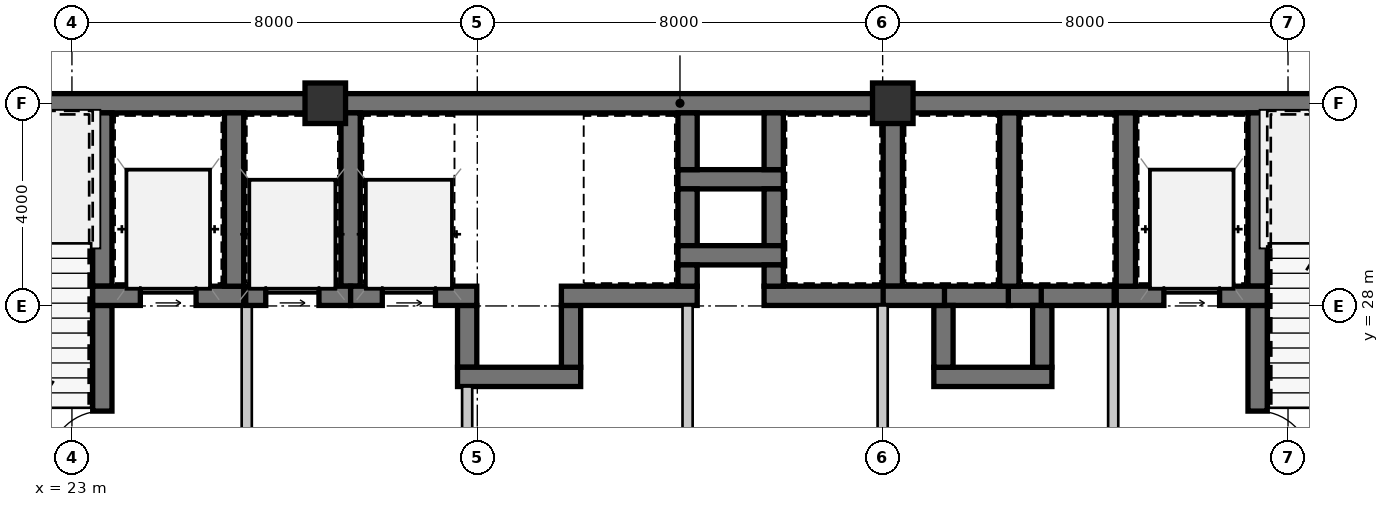
"""IFC4 building model, lengths in metres.
Left out: names, types, materials, properties, quantities, classifications, styles, units other than length and angle.
Written with IfcOpenShell. Run it as: python <this file> out.ifc"""

import sys

from ifc_helpers import new_model, si_unit, direction, frame, frame_2d, origin, origin_2d, place, context, subcontext, project, spatial, rectangle, extrude, source, transform, mapped, element, fill, save


model = new_model("IFC4")
c1 = context("Model", 3, precision=1e-05, world=origin(), true_north=direction((0.0, 1.0)))
c2 = subcontext(c1, "Body", "Model", "MODEL_VIEW")
j1 = project(units=[si_unit("LENGTHUNIT", "METRE"), si_unit("PLANEANGLEUNIT", "RADIAN")], contexts=[c1])
p1 = place(None, origin())
s1 = spatial("IfcSite", under=j1, at=p1, CompositionType="ELEMENT")
p2 = place(p1, origin())
s2 = spatial("IfcBuilding", under=s1, at=p2, CompositionType="ELEMENT")
p3 = place(p2, frame((0.0, 0.0, 38.85)))
s3 = spatial("IfcBuildingStorey", under=s2, at=p3, CompositionType="ELEMENT", Elevation=38.85)
m1 = source(origin(), c2, "Body", "SweptSolid", [
    extrude(rectangle(XDim=0.8, YDim=0.8, at=origin_2d()), origin(), (0.0, 0.0, 1.0), 3.15),
])
for number, where, z_axis, x_axis in (
    (1, (28.0, 32.0, 0.0), (0.0, 0.0, 1.0), (1.0, 0.0, 0.0)),
    (2, (39.2, 32.0, 0.0), (0.0, 0.0, 1.0), (1.0, 0.0, 0.0)),
):
    element("IfcColumn", number, at=place(p3, frame(where, z_axis=z_axis, x_axis=x_axis)), inside=s3, PredefinedType="COLUMN", context=c2, shape_type="MappedRepresentation", body=[
        mapped(m1, transform((0.0, 0.0, 0.0), scale=1.0)),
    ])
m2 = source(origin(), c2, "Body", "SweptSolid", [
    extrude(rectangle(XDim=9.19, YDim=0.38, at=frame_2d((4.595, 0.0))), origin(), (0.0, 0.0, 1.0), 2.93),
])
p4 = place(p3, frame((18.81, 32.0, 0.0), z_axis=(0.0, 0.0, 1.0), x_axis=(1.0, 0.0, 0.0)))
e3 = element("IfcWall", 3, at=p4, inside=s3, PredefinedType="SHEAR", context=c2, shape_type="MappedRepresentation", body=[
    mapped(m2, transform((0.0, 0.0, 0.0), scale=1.0)),
])
m3 = source(origin(), c2, "Body", "SweptSolid", [
    extrude(rectangle(XDim=11.2, YDim=0.38, at=frame_2d((5.6, 0.0))), origin(), (0.0, 0.0, 1.0), 2.93),
])
p5 = place(p3, frame((28.0, 32.0, 0.0), z_axis=(0.0, 0.0, 1.0), x_axis=(1.0, 0.0, 0.0)))
e4 = element("IfcWall", 4, at=p5, inside=s3, PredefinedType="SHEAR", context=c2, shape_type="MappedRepresentation", body=[
    mapped(m3, transform((0.0, 0.0, 0.0), scale=1.0)),
])
m4 = source(origin(), c2, "Body", "SweptSolid", [
    extrude(rectangle(XDim=11.99, YDim=0.38, at=frame_2d((5.995, 0.0))), origin(), (0.0, 0.0, 1.0), 2.93),
])
p6 = place(p3, frame((39.2, 32.0, 0.0), z_axis=(0.0, 0.0, 1.0), x_axis=(1.0, 0.0, 0.0)))
e5 = element("IfcWall", 5, at=p6, inside=s3, PredefinedType="SHEAR", context=c2, shape_type="MappedRepresentation", body=[
    mapped(m4, transform((0.0, 0.0, 0.0), scale=1.0)),
])
m5 = source(origin(), c2, "Body", "SweptSolid", [
    extrude(rectangle(XDim=3.42, YDim=0.38, at=frame_2d((1.71, 0.0))), origin(), (0.0, 0.0, 1.0), 2.93),
])
p7 = place(p3, frame((23.6, 28.39, 0.0), z_axis=(0.0, 0.0, 1.0), x_axis=(0.0, 1.0, 0.0)))
e6 = element("IfcWall", 6, at=p7, inside=s3, PredefinedType="SHEAR", context=c2, shape_type="MappedRepresentation", body=[
    mapped(m5, transform((0.0, 0.0, 0.0), scale=1.0)),
])
m6 = source(origin(), c2, "Body", "SweptSolid", [
    extrude(rectangle(XDim=3.82, YDim=0.38, at=frame_2d((1.91, 0.0))), origin(), (0.0, 0.0, 1.0), 2.93),
])
p8 = place(p3, frame((23.6, 24.19, 0.0), z_axis=(0.0, 0.0, 1.0), x_axis=(0.0, 1.0, 0.0)))
e7 = element("IfcWall", 7, at=p8, inside=s3, PredefinedType="SHEAR", context=c2, shape_type="MappedRepresentation", body=[
    mapped(m6, transform((0.0, 0.0, 0.0), scale=1.0)),
])
m7 = source(origin(), c2, "Body", "SweptSolid", [
    extrude(rectangle(XDim=1.05, YDim=2.1, at=frame_2d((0.525, 1.05))), frame((0.0, 0.2, 0.0), z_axis=(0.0, -1.0, 0.0), x_axis=(1.0, 0.0, 0.0)), (0.0, 0.0, 1.0), 0.4),
])
p9 = place(p8, frame((0.685, 0.0, 0.0)))
e8 = element("IfcOpeningElement", 8, at=p9, cuts=e7, PredefinedType="OPENING", context=c2, shape_type="MappedRepresentation", body=[
    mapped(m7, transform((0.0, 0.0, 0.0), scale=1.0)),
])
m8 = source(origin(), c2, "Body", "SweptSolid", [
    extrude(rectangle(XDim=2.98, YDim=0.38, at=frame_2d((1.49, 0.0))), origin(), (0.0, 0.0, 1.0), 2.93),
])
p10 = place(p3, frame((23.41, 28.2, 0.0), z_axis=(0.0, 0.0, 1.0), x_axis=(1.0, 0.0, 0.0)))
e9 = element("IfcWall", 9, at=p10, inside=s3, PredefinedType="SHEAR", context=c2, shape_type="MappedRepresentation", body=[
    mapped(m8, transform((0.0, 0.0, 0.0), scale=1.0)),
])
m9 = source(origin(), c2, "Body", "SweptSolid", [
    extrude(rectangle(XDim=1.1, YDim=2.15, at=frame_2d((0.55, 1.075))), frame((0.0, 0.2, 0.0), z_axis=(0.0, -1.0, 0.0), x_axis=(1.0, 0.0, 0.0)), (0.0, 0.0, 1.0), 0.4),
])
p11 = place(p10, frame((0.94, 0.0, 0.0)))
e10 = element("IfcOpeningElement", 10, at=p11, cuts=e9, PredefinedType="OPENING", context=c2, shape_type="MappedRepresentation", body=[
    mapped(m9, transform((0.0, 0.0, 0.0), scale=1.0)),
])
p12 = place(p3, frame((26.2, 28.39, 0.0), z_axis=(0.0, 0.0, 1.0), x_axis=(0.0, 1.0, 0.0)))
e11 = element("IfcWall", 11, at=p12, inside=s3, PredefinedType="SHEAR", context=c2, shape_type="MappedRepresentation", body=[
    mapped(m5, transform((0.0, 0.0, 0.0), scale=1.0)),
])
m10 = source(origin(), c2, "Body", "SweptSolid", [
    extrude(rectangle(XDim=3.91, YDim=0.2, at=frame_2d((1.955, 0.0))), origin(), (0.0, 0.0, 1.0), 2.93),
])
p13 = place(p3, frame((26.45, 24.1, 0.0), z_axis=(0.0, 0.0, 1.0), x_axis=(0.0, 1.0, 0.0)))
e12 = element("IfcWall", 12, at=p13, inside=s3, PredefinedType="SOLIDWALL", context=c2, shape_type="MappedRepresentation", body=[
    mapped(m10, transform((0.0, 0.0, 0.0), scale=1.0)),
])
p14 = place(p3, frame((46.4, 31.81, 0.0), z_axis=(0.0, 0.0, 1.0), x_axis=(0.0, -1.0, 0.0)))
e13 = element("IfcWall", 13, at=p14, inside=s3, PredefinedType="SHEAR", context=c2, shape_type="MappedRepresentation", body=[
    mapped(m5, transform((0.0, 0.0, 0.0), scale=1.0)),
])
p15 = place(p3, frame((46.4, 28.01, 0.0), z_axis=(0.0, 0.0, 1.0), x_axis=(0.0, -1.0, 0.0)))
e14 = element("IfcWall", 14, at=p15, inside=s3, PredefinedType="SHEAR", context=c2, shape_type="MappedRepresentation", body=[
    mapped(m6, transform((0.0, 0.0, 0.0), scale=1.0)),
])
p16 = place(p15, frame((2.085, 0.0, 0.0)))
e15 = element("IfcOpeningElement", 15, at=p16, cuts=e14, PredefinedType="OPENING", context=c2, shape_type="MappedRepresentation", body=[
    mapped(m7, transform((0.0, 0.0, 0.0), scale=1.0)),
])
p17 = place(p3, frame((43.61, 28.2, 0.0), z_axis=(0.0, 0.0, 1.0), x_axis=(1.0, 0.0, 0.0)))
e16 = element("IfcWall", 16, at=p17, inside=s3, PredefinedType="SHEAR", context=c2, shape_type="MappedRepresentation", body=[
    mapped(m8, transform((0.0, 0.0, 0.0), scale=1.0)),
])
p18 = place(p17, frame((0.94, 0.0, 0.0)))
e17 = element("IfcOpeningElement", 17, at=p18, cuts=e16, PredefinedType="OPENING", context=c2, shape_type="MappedRepresentation", body=[
    mapped(m9, transform((0.0, 0.0, 0.0), scale=1.0)),
])
p19 = place(p3, frame((43.8, 31.81, 0.0), z_axis=(0.0, 0.0, 1.0), x_axis=(0.0, -1.0, 0.0)))
e18 = element("IfcWall", 18, at=p19, inside=s3, PredefinedType="SHEAR", context=c2, shape_type="MappedRepresentation", body=[
    mapped(m5, transform((0.0, 0.0, 0.0), scale=1.0)),
])
p20 = place(p3, frame((43.55, 28.01, 0.0), z_axis=(0.0, 0.0, 1.0), x_axis=(0.0, -1.0, 0.0)))
e19 = element("IfcWall", 19, at=p20, inside=s3, PredefinedType="SOLIDWALL", context=c2, shape_type="MappedRepresentation", body=[
    mapped(m10, transform((0.0, 0.0, 0.0), scale=1.0)),
])
m11 = source(origin(), c2, "Body", "SweptSolid", [
    extrude(rectangle(XDim=2.08, YDim=0.38, at=frame_2d((1.04, 0.0))), origin(), (0.0, 0.0, 1.0), 2.93),
])
p21 = place(p3, frame((34.96, 30.5, 0.0), z_axis=(0.0, 0.0, 1.0), x_axis=(1.0, 0.0, 0.0)))
e20 = element("IfcWall", 20, at=p21, inside=s3, PredefinedType="SHEAR", context=c2, shape_type="MappedRepresentation", body=[
    mapped(m11, transform((0.0, 0.0, 0.0), scale=1.0)),
])
m12 = source(origin(), c2, "Body", "SweptSolid", [
    extrude(rectangle(XDim=1.12, YDim=0.38, at=frame_2d((0.56, 0.0))), origin(), (0.0, 0.0, 1.0), 2.93),
])
for number, where, z_axis, x_axis in (
    (21, (35.15, 31.81, 0.0), (0.0, 0.0, 1.0), (0.0, -1.0, 0.0)),
    (22, (36.85, 30.69, 0.0), (0.0, 0.0, 1.0), (0.0, 1.0, 0.0)),
    (23, (35.15, 30.31, 0.0), (0.0, 0.0, 1.0), (0.0, -1.0, 0.0)),
    (24, (36.85, 29.19, 0.0), (0.0, 0.0, 1.0), (0.0, 1.0, 0.0)),
):
    element("IfcWall", number, at=place(p3, frame(where, z_axis=z_axis, x_axis=x_axis)), inside=s3, PredefinedType="SHEAR", context=c2, shape_type="MappedRepresentation", body=[
        mapped(m12, transform((0.0, 0.0, 0.0), scale=1.0)),
    ])
p22 = place(p3, frame((34.96, 29.0, 0.0), z_axis=(0.0, 0.0, 1.0), x_axis=(1.0, 0.0, 0.0)))
e25 = element("IfcWall", 25, at=p22, inside=s3, PredefinedType="SHEAR", context=c2, shape_type="MappedRepresentation", body=[
    mapped(m11, transform((0.0, 0.0, 0.0), scale=1.0)),
])
m13 = source(origin(), c2, "Body", "SweptSolid", [
    extrude(rectangle(XDim=1.22, YDim=0.38, at=frame_2d((0.61, 0.0))), origin(), (0.0, 0.0, 1.0), 2.93),
])
p23 = place(p3, frame((30.8, 28.01, 0.0), z_axis=(0.0, 0.0, 1.0), x_axis=(0.0, -1.0, 0.0)))
e26 = element("IfcWall", 26, at=p23, inside=s3, PredefinedType="SHEAR", context=c2, shape_type="MappedRepresentation", body=[
    mapped(m13, transform((0.0, 0.0, 0.0), scale=1.0)),
])
m14 = source(origin(), c2, "Body", "SweptSolid", [
    extrude(rectangle(XDim=2.43, YDim=0.38, at=frame_2d((1.215, 0.0))), origin(), (0.0, 0.0, 1.0), 2.93),
])
p24 = place(p3, frame((30.61, 26.6, 0.0), z_axis=(0.0, 0.0, 1.0), x_axis=(1.0, 0.0, 0.0)))
e27 = element("IfcWall", 27, at=p24, inside=s3, PredefinedType="SHEAR", context=c2, shape_type="MappedRepresentation", body=[
    mapped(m14, transform((0.0, 0.0, 0.0), scale=1.0)),
])
p25 = place(p3, frame((32.85, 26.79, 0.0), z_axis=(0.0, 0.0, 1.0), x_axis=(0.0, 1.0, 0.0)))
e28 = element("IfcWall", 28, at=p25, inside=s3, PredefinedType="SHEAR", context=c2, shape_type="MappedRepresentation", body=[
    mapped(m13, transform((0.0, 0.0, 0.0), scale=1.0)),
])
m15 = source(origin(), c2, "Body", "SweptSolid", [
    extrude(rectangle(XDim=1.32, YDim=0.38, at=frame_2d((0.66, 0.0))), origin(), (0.0, 0.0, 1.0), 2.93),
])
p26 = place(p3, frame((41.52, 28.2, 0.0), z_axis=(0.0, 0.0, 1.0), x_axis=(-1.0, 0.0, 0.0)))
e29 = element("IfcWall", 29, at=p26, inside=s3, PredefinedType="SHEAR", context=c2, shape_type="MappedRepresentation", body=[
    mapped(m15, transform((0.0, 0.0, 0.0), scale=1.0)),
])
m16 = source(origin(), c2, "Body", "SweptSolid", [
    extrude(rectangle(XDim=0.67, YDim=0.38, at=frame_2d((0.335, 0.0))), origin(), (0.0, 0.0, 1.0), 2.93),
])
p27 = place(p3, frame((42.15, 28.2, 0.0), z_axis=(0.0, 0.0, 1.0), x_axis=(-1.0, 0.0, 0.0)))
e30 = element("IfcWall", 30, at=p27, inside=s3, PredefinedType="SHEAR", context=c2, shape_type="MappedRepresentation", body=[
    mapped(m16, transform((0.0, 0.0, 0.0), scale=1.0)),
])
m17 = source(origin(), c2, "Body", "SweptSolid", [
    extrude(rectangle(XDim=2.33, YDim=0.38, at=frame_2d((1.165, 0.0))), origin(), (0.0, 0.0, 1.0), 2.93),
])
p28 = place(p3, frame((40.01, 26.6, 0.0), z_axis=(0.0, 0.0, 1.0), x_axis=(1.0, 0.0, 0.0)))
e31 = element("IfcWall", 31, at=p28, inside=s3, PredefinedType="SHEAR", context=c2, shape_type="MappedRepresentation", body=[
    mapped(m17, transform((0.0, 0.0, 0.0), scale=1.0)),
])
for number, where, z_axis, x_axis in (
    (32, (40.2, 28.01, 0.0), (0.0, 0.0, 1.0), (0.0, -1.0, 0.0)),
    (33, (42.15, 26.79, 0.0), (0.0, 0.0, 1.0), (0.0, 1.0, 0.0)),
):
    element("IfcWall", number, at=place(p3, frame(where, z_axis=z_axis, x_axis=x_axis)), inside=s3, PredefinedType="SHEAR", context=c2, shape_type="MappedRepresentation", body=[
        mapped(m13, transform((0.0, 0.0, 0.0), scale=1.0)),
    ])
p29 = place(p3, frame((28.5, 28.39, 0.0), z_axis=(0.0, 0.0, 1.0), x_axis=(0.0, 1.0, 0.0)))
e34 = element("IfcWall", 34, at=p29, inside=s3, PredefinedType="SHEAR", context=c2, shape_type="MappedRepresentation", body=[
    mapped(m5, transform((0.0, 0.0, 0.0), scale=1.0)),
])
m18 = source(origin(), c2, "Body", "SweptSolid", [
    extrude(rectangle(XDim=2.07, YDim=0.38, at=frame_2d((1.035, 0.0))), origin(), (0.0, 0.0, 1.0), 2.93),
])
p30 = place(p3, frame((26.43, 28.2, 0.0), z_axis=(0.0, 0.0, 1.0), x_axis=(1.0, 0.0, 0.0)))
e35 = element("IfcWall", 35, at=p30, inside=s3, PredefinedType="SHEAR", context=c2, shape_type="MappedRepresentation", body=[
    mapped(m18, transform((0.0, 0.0, 0.0), scale=1.0)),
])
m19 = source(origin(), c2, "Body", "SweptSolid", [
    extrude(rectangle(XDim=1.05, YDim=2.15, at=frame_2d((0.525, 1.075))), frame((0.0, 0.2, 0.0), z_axis=(0.0, -1.0, 0.0), x_axis=(1.0, 0.0, 0.0)), (0.0, 0.0, 1.0), 0.4),
])
p31 = place(p30, frame((0.395, 0.0, 0.0)))
e36 = element("IfcOpeningElement", 36, at=p31, cuts=e35, PredefinedType="OPENING", context=c2, shape_type="MappedRepresentation", body=[
    mapped(m19, transform((0.0, 0.0, 0.0), scale=1.0)),
])
m20 = source(origin(), c2, "Body", "SweptSolid", [
    extrude(rectangle(XDim=2.49, YDim=0.38, at=frame_2d((1.245, 0.0))), origin(), (0.0, 0.0, 1.0), 2.93),
])
p32 = place(p3, frame((28.5, 28.2, 0.0), z_axis=(0.0, 0.0, 1.0), x_axis=(1.0, 0.0, 0.0)))
e37 = element("IfcWall", 37, at=p32, inside=s3, PredefinedType="SHEAR", context=c2, shape_type="MappedRepresentation", body=[
    mapped(m20, transform((0.0, 0.0, 0.0), scale=1.0)),
])
p33 = place(p32, frame((0.625, 0.0, 0.0)))
e38 = element("IfcOpeningElement", 38, at=p33, cuts=e37, PredefinedType="OPENING", context=c2, shape_type="MappedRepresentation", body=[
    mapped(m19, transform((0.0, 0.0, 0.0), scale=1.0)),
])
m21 = source(origin(), c2, "Body", "SweptSolid", [
    extrude(rectangle(XDim=2.31, YDim=0.2, at=frame_2d((1.155, 0.0))), origin(), (0.0, 0.0, 1.0), 2.93),
])
p34 = place(p3, frame((30.8, 26.41, 0.0), z_axis=(0.0, 0.0, 1.0), x_axis=(0.0, -1.0, 0.0)))
e39 = element("IfcWall", 39, at=p34, inside=s3, PredefinedType="SOLIDWALL", context=c2, shape_type="MappedRepresentation", body=[
    mapped(m21, transform((0.0, 0.0, 0.0), scale=1.0)),
])
m22 = source(origin(), c2, "Body", "SweptSolid", [
    extrude(rectangle(XDim=2.68, YDim=0.38, at=frame_2d((1.34, 0.0))), origin(), (0.0, 0.0, 1.0), 2.93),
])
p35 = place(p3, frame((32.66, 28.2, 0.0), z_axis=(0.0, 0.0, 1.0), x_axis=(1.0, 0.0, 0.0)))
e40 = element("IfcWall", 40, at=p35, inside=s3, PredefinedType="SHEAR", context=c2, shape_type="MappedRepresentation", body=[
    mapped(m22, transform((0.0, 0.0, 0.0), scale=1.0)),
])
m23 = source(origin(), c2, "Body", "SweptSolid", [
    extrude(rectangle(XDim=0.42, YDim=0.38, at=frame_2d((0.21, 0.0))), origin(), (0.0, 0.0, 1.0), 2.93),
])
p36 = place(p3, frame((35.15, 28.39, 0.0), z_axis=(0.0, 0.0, 1.0), x_axis=(0.0, 1.0, 0.0)))
e41 = element("IfcWall", 41, at=p36, inside=s3, PredefinedType="SHEAR", context=c2, shape_type="MappedRepresentation", body=[
    mapped(m23, transform((0.0, 0.0, 0.0), scale=1.0)),
])
p37 = place(p3, frame((39.2, 28.39, 0.0), z_axis=(0.0, 0.0, 1.0), x_axis=(0.0, 1.0, 0.0)))
e42 = element("IfcWall", 42, at=p37, inside=s3, PredefinedType="SHEAR", context=c2, shape_type="MappedRepresentation", body=[
    mapped(m5, transform((0.0, 0.0, 0.0), scale=1.0)),
])
m24 = source(origin(), c2, "Body", "SweptSolid", [
    extrude(rectangle(XDim=2.36, YDim=0.38, at=frame_2d((1.18, 0.0))), origin(), (0.0, 0.0, 1.0), 2.93),
])
p38 = place(p3, frame((36.66, 28.2, 0.0), z_axis=(0.0, 0.0, 1.0), x_axis=(1.0, 0.0, 0.0)))
e43 = element("IfcWall", 43, at=p38, inside=s3, PredefinedType="SHEAR", context=c2, shape_type="MappedRepresentation", body=[
    mapped(m24, transform((0.0, 0.0, 0.0), scale=1.0)),
])
p39 = place(p3, frame((36.85, 28.81, 0.0), z_axis=(0.0, 0.0, 1.0), x_axis=(0.0, -1.0, 0.0)))
e44 = element("IfcWall", 44, at=p39, inside=s3, PredefinedType="SHEAR", context=c2, shape_type="MappedRepresentation", body=[
    mapped(m23, transform((0.0, 0.0, 0.0), scale=1.0)),
])
p40 = place(p3, frame((41.5, 28.39, 0.0), z_axis=(0.0, 0.0, 1.0), x_axis=(0.0, 1.0, 0.0)))
e45 = element("IfcWall", 45, at=p40, inside=s3, PredefinedType="SHEAR", context=c2, shape_type="MappedRepresentation", body=[
    mapped(m5, transform((0.0, 0.0, 0.0), scale=1.0)),
])
m25 = source(origin(), c2, "Body", "SweptSolid", [
    extrude(rectangle(XDim=1.21, YDim=0.38, at=frame_2d((0.605, 0.0))), origin(), (0.0, 0.0, 1.0), 2.93),
])
p41 = place(p3, frame((39.01, 28.2, 0.0), z_axis=(0.0, 0.0, 1.0), x_axis=(1.0, 0.0, 0.0)))
e46 = element("IfcWall", 46, at=p41, inside=s3, PredefinedType="SHEAR", context=c2, shape_type="MappedRepresentation", body=[
    mapped(m25, transform((0.0, 0.0, 0.0), scale=1.0)),
])
m26 = source(origin(), c2, "Body", "SweptSolid", [
    extrude(rectangle(XDim=1.44, YDim=0.38, at=frame_2d((0.72, 0.0))), origin(), (0.0, 0.0, 1.0), 2.93),
])
p42 = place(p3, frame((42.13, 28.2, 0.0), z_axis=(0.0, 0.0, 1.0), x_axis=(1.0, 0.0, 0.0)))
e47 = element("IfcWall", 47, at=p42, inside=s3, PredefinedType="SHEAR", context=c2, shape_type="MappedRepresentation", body=[
    mapped(m26, transform((0.0, 0.0, 0.0), scale=1.0)),
])
for number, where, z_axis, x_axis in (
    (48, (35.15, 28.01, 0.0), (0.0, 0.0, 1.0), (0.0, -1.0, 0.0)),
    (49, (39.0, 28.01, 0.0), (0.0, 0.0, 1.0), (0.0, -1.0, 0.0)),
):
    element("IfcWall", number, at=place(p3, frame(where, z_axis=z_axis, x_axis=x_axis)), inside=s3, PredefinedType="SOLIDWALL", context=c2, shape_type="MappedRepresentation", body=[
        mapped(m10, transform((0.0, 0.0, 0.0), scale=1.0)),
    ])
m27 = source(origin(), c2, "Body", "SweptSolid", [
    extrude(rectangle(XDim=1.05, YDim=2.1, at=frame_2d((0.525, 1.05))), frame((0.0, 0.025, 0.0), z_axis=(0.0, -1.0, 0.0), x_axis=(1.0, 0.0, 0.0)), (0.0, 0.0, 1.0), 0.05),
])
p43 = place(p9, origin())
e50 = element("IfcDoor", 50, at=p43, inside=s3, OperationType="SINGLE_SWING_LEFT", PredefinedType="DOOR", context=c2, shape_type="MappedRepresentation", body=[
    mapped(m27, transform((0.0, 0.0, 0.0), scale=1.0)),
])
fill(e8, e50)
m28 = source(origin(), c2, "Body", "SweptSolid", [
    extrude(rectangle(XDim=1.1, YDim=2.15, at=frame_2d((0.55, 1.075))), frame((0.0, 0.025, 0.0), z_axis=(0.0, -1.0, 0.0), x_axis=(1.0, 0.0, 0.0)), (0.0, 0.0, 1.0), 0.05),
])
p44 = place(p11, origin())
e51 = element("IfcDoor", 51, at=p44, inside=s3, OperationType="SLIDING_TO_LEFT", PredefinedType="DOOR", context=c2, shape_type="MappedRepresentation", body=[
    mapped(m28, transform((0.0, 0.0, 0.0), scale=1.0)),
])
fill(e10, e51)
p45 = place(p16, origin())
e52 = element("IfcDoor", 52, at=p45, inside=s3, OperationType="SINGLE_SWING_RIGHT", PredefinedType="DOOR", context=c2, shape_type="MappedRepresentation", body=[
    mapped(m27, transform((0.0, 0.0, 0.0), scale=1.0)),
])
fill(e15, e52)
p46 = place(p18, origin())
e53 = element("IfcDoor", 53, at=p46, inside=s3, OperationType="SLIDING_TO_LEFT", PredefinedType="DOOR", context=c2, shape_type="MappedRepresentation", body=[
    mapped(m28, transform((0.0, 0.0, 0.0), scale=1.0)),
])
fill(e17, e53)
m29 = source(origin(), c2, "Body", "SweptSolid", [
    extrude(rectangle(XDim=1.05, YDim=2.15, at=frame_2d((0.525, 1.075))), frame((0.0, 0.025, 0.0), z_axis=(0.0, -1.0, 0.0), x_axis=(1.0, 0.0, 0.0)), (0.0, 0.0, 1.0), 0.05),
])
p47 = place(p31, origin())
e54 = element("IfcDoor", 54, at=p47, inside=s3, OperationType="SLIDING_TO_LEFT", PredefinedType="DOOR", context=c2, shape_type="MappedRepresentation", body=[
    mapped(m29, transform((0.0, 0.0, 0.0), scale=1.0)),
])
fill(e36, e54)
p48 = place(p33, origin())
e55 = element("IfcDoor", 55, at=p48, inside=s3, OperationType="SLIDING_TO_LEFT", PredefinedType="DOOR", context=c2, shape_type="MappedRepresentation", body=[
    mapped(m29, transform((0.0, 0.0, 0.0), scale=1.0)),
])
fill(e38, e55)
save(model, sys.argv[1])
